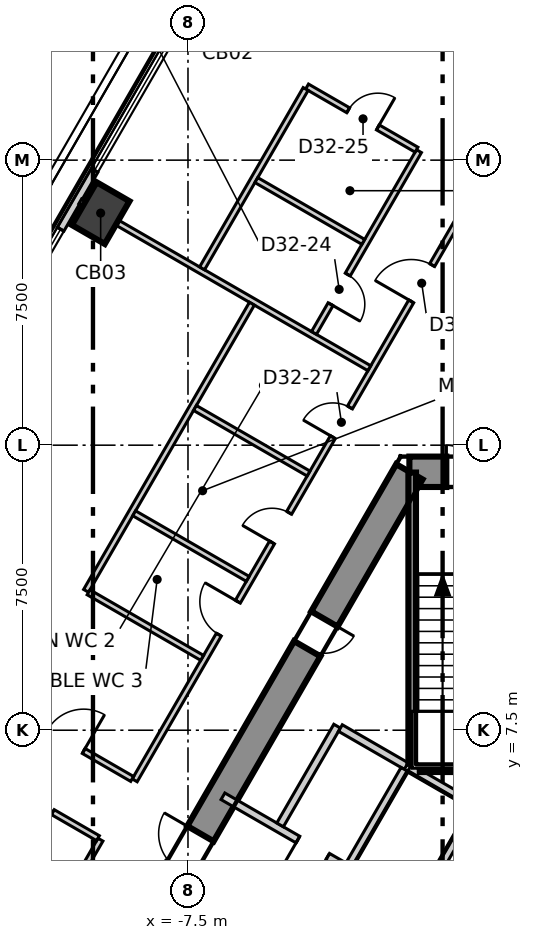
"""IFC4 building model, lengths in metres.
Left out: names, types, materials, properties, quantities, classifications, styles, units other than length and angle.
Written with IfcOpenShell. Run it as: python <this file> out.ifc"""

import sys

from ifc_helpers import new_model, si_unit, direction, frame, frame_2d, origin, origin_2d, place, context, subcontext, project, spatial, polyline, rectangle, outline, extrude, element, fill, save


model = new_model("IFC4")
c1 = context("Model", 3, precision=1e-05, world=origin(), true_north=direction((0.0, 1.0)))
c2 = subcontext(c1, "Body", "Model", "MODEL_VIEW")
j1 = project(units=[si_unit("LENGTHUNIT", "METRE"), si_unit("PLANEANGLEUNIT", "RADIAN")], contexts=[c1])
p1 = place(None, origin())
s1 = spatial("IfcSite", under=j1, at=p1, CompositionType="ELEMENT")
p2 = place(p1, origin())
s2 = spatial("IfcBuilding", under=s1, at=p2, CompositionType="ELEMENT")
p3 = place(p2, frame((0.0, 0.0, 140.3)))
s3 = spatial("IfcBuildingStorey", under=s2, at=p3, CompositionType="ELEMENT", Elevation=140.3)
p4 = place(p3, frame((1.674, 14.3, -0.3), z_axis=(0.0, 0.0, 1.0), x_axis=(-1.0, 0.0, 0.0)))
e1 = element("IfcWall", 1, at=p4, inside=s3, PredefinedType="SHEAR", context=c2, shape_type="SweptSolid", body=[
    extrude(outline(polyline([(-0.231, -0.4), (1.674, -0.4), (3.579, -0.4), (3.117, 0.4), (1.674, 0.4), (0.231, 0.4), (-0.231, -0.4)])), origin(), (0.0, 0.0, 1.0), 4.0),
])
p5 = place(p4, frame((0.974, 0.0, 0.3)))
e2 = element("IfcOpeningElement", 2, at=p5, cuts=e1, PredefinedType="OPENING", context=c2, shape_type="SweptSolid", body=[
    extrude(rectangle(XDim=1.4, YDim=2.1, at=frame_2d((0.7, 1.05))), frame((0.0, 0.41, 0.0), z_axis=(0.0, -1.0, 0.0), x_axis=(1.0, 0.0, 0.0)), (0.0, 0.0, 1.0), 0.82),
])
p6 = place(p3, frame((-1.674, 14.3, -0.3), z_axis=(0.0, 0.0, 1.0), x_axis=(-0.499995765644, -0.866027848477, 0.0)))
e3 = element("IfcWall", 3, at=p6, inside=s3, PredefinedType="SHEAR", context=c2, shape_type="SweptSolid", body=[
    extrude(outline(polyline([(-0.231, -0.4), (1.732, -0.4), (3.695, -0.4), (5.658, -0.4), (7.621, -0.4), (9.584, -0.4), (11.547, -0.4), (13.51, -0.4), (15.473, -0.4), (17.436, -0.4), (19.399, -0.4), (21.362, -0.4), (23.325, -0.4), (22.863, 0.4), (20.977, 0.4), (19.091, 0.4), (17.205, 0.4), (15.319, 0.4), (13.433, 0.4), (11.547, 0.4), (9.661, 0.4), (7.775, 0.4), (5.889, 0.4), (4.003, 0.4), (2.117, 0.4), (0.231, 0.4), (-0.231, -0.4)])), origin(), (0.0, 0.0, 1.0), 4.0),
])
p7 = place(p6, frame((10.997, 0.0, 0.3)))
e4 = element("IfcOpeningElement", 4, at=p7, cuts=e3, PredefinedType="OPENING", context=c2, shape_type="SweptSolid", body=[
    extrude(rectangle(XDim=1.1, YDim=2.1, at=frame_2d((0.55, 1.05))), frame((0.0, 0.41, 0.0), z_axis=(0.0, -1.0, 0.0), x_axis=(1.0, 0.0, 0.0)), (0.0, 0.0, 1.0), 0.82),
])
p8 = place(p6, frame((4.474, 0.0, 0.3)))
e5 = element("IfcOpeningElement", 5, at=p8, cuts=e3, PredefinedType="OPENING", context=c2, shape_type="SweptSolid", body=[
    extrude(rectangle(XDim=0.9, YDim=2.1, at=frame_2d((0.45, 1.05))), frame((0.0, 0.41, 0.0), z_axis=(0.0, -1.0, 0.0), x_axis=(1.0, 0.0, 0.0)), (0.0, 0.0, 1.0), 0.82),
])
p9 = place(p3, frame((-9.798, 21.107, -0.3), z_axis=(0.0, 0.0, 1.0), x_axis=(0.5, 0.866025403784, 0.0)))
e6 = element("IfcColumn", 6, at=p9, inside=s3, PredefinedType="COLUMN", context=c2, shape_type="SweptSolid", body=[
    extrude(rectangle(XDim=1.3, YDim=1.0, at=origin_2d()), origin(), (0.0, 0.0, 1.0), 4.0),
])
p10 = place(p3, frame((-3.063, 34.172, 0.0), z_axis=(0.0, 0.0, 1.0), x_axis=(-0.500008098571, -0.866020728022, 0.0)))
e7 = element("IfcWall", 7, at=p10, inside=s3, PredefinedType="ELEMENTEDWALL", context=c2, shape_type="SweptSolid", body=[
    extrude(rectangle(XDim=56.105, YDim=0.2, at=frame_2d((28.052, 0.0))), origin(), (0.0, 0.0, 1.0), 3.7),
])
p11 = place(p10, frame((2.197, 0.0, 0.9)))
e8 = element("IfcOpeningElement", 8, at=p11, cuts=e7, PredefinedType="OPENING", context=c2, shape_type="SweptSolid", body=[
    extrude(rectangle(XDim=4.9, YDim=2.5, at=frame_2d((2.45, 1.25))), frame((0.0, 0.11, 0.0), z_axis=(0.0, -1.0, 0.0), x_axis=(1.0, 0.0, 0.0)), (0.0, 0.0, 1.0), 0.22),
])
p12 = place(p10, frame((8.887, 0.0, 0.9)))
e9 = element("IfcOpeningElement", 9, at=p12, cuts=e7, PredefinedType="OPENING", context=c2, shape_type="SweptSolid", body=[
    extrude(rectangle(XDim=4.9, YDim=2.5, at=frame_2d((2.45, 1.25))), frame((0.0, 0.11, 0.0), z_axis=(0.0, -1.0, 0.0), x_axis=(1.0, 0.0, 0.0)), (0.0, 0.0, 1.0), 0.22),
])
p13 = place(p10, frame((15.577, 0.0, 0.9)))
e10 = element("IfcOpeningElement", 10, at=p13, cuts=e7, PredefinedType="OPENING", context=c2, shape_type="SweptSolid", body=[
    extrude(rectangle(XDim=4.9, YDim=2.5, at=frame_2d((2.45, 1.25))), frame((0.0, 0.11, 0.0), z_axis=(0.0, -1.0, 0.0), x_axis=(1.0, 0.0, 0.0)), (0.0, 0.0, 1.0), 0.22),
])
p14 = place(p10, frame((22.267, 0.0, 0.9)))
e11 = element("IfcOpeningElement", 11, at=p14, cuts=e7, PredefinedType="OPENING", context=c2, shape_type="SweptSolid", body=[
    extrude(rectangle(XDim=4.9, YDim=2.5, at=frame_2d((2.45, 1.25))), frame((0.0, 0.11, 0.0), z_axis=(0.0, -1.0, 0.0), x_axis=(1.0, 0.0, 0.0)), (0.0, 0.0, 1.0), 0.22),
])
p15 = place(p10, frame((28.957, 0.0, 0.9)))
e12 = element("IfcOpeningElement", 12, at=p15, cuts=e7, PredefinedType="OPENING", context=c2, shape_type="SweptSolid", body=[
    extrude(rectangle(XDim=4.9, YDim=2.5, at=frame_2d((2.45, 1.25))), frame((0.0, 0.11, 0.0), z_axis=(0.0, -1.0, 0.0), x_axis=(1.0, 0.0, 0.0)), (0.0, 0.0, 1.0), 0.22),
])
p16 = place(p10, frame((35.647, 0.0, 0.9)))
e13 = element("IfcOpeningElement", 13, at=p16, cuts=e7, PredefinedType="OPENING", context=c2, shape_type="SweptSolid", body=[
    extrude(rectangle(XDim=4.9, YDim=2.5, at=frame_2d((2.45, 1.25))), frame((0.0, 0.11, 0.0), z_axis=(0.0, -1.0, 0.0), x_axis=(1.0, 0.0, 0.0)), (0.0, 0.0, 1.0), 0.22),
])
p17 = place(p10, frame((42.337, 0.0, 0.9)))
e14 = element("IfcOpeningElement", 14, at=p17, cuts=e7, PredefinedType="OPENING", context=c2, shape_type="SweptSolid", body=[
    extrude(rectangle(XDim=4.9, YDim=2.5, at=frame_2d((2.45, 1.25))), frame((0.0, 0.11, 0.0), z_axis=(0.0, -1.0, 0.0), x_axis=(1.0, 0.0, 0.0)), (0.0, 0.0, 1.0), 0.22),
])
p18 = place(p10, frame((49.027, 0.0, 0.9)))
e15 = element("IfcOpeningElement", 15, at=p18, cuts=e7, PredefinedType="OPENING", context=c2, shape_type="SweptSolid", body=[
    extrude(rectangle(XDim=4.9, YDim=2.5, at=frame_2d((2.45, 1.25))), frame((0.0, 0.11, 0.0), z_axis=(0.0, -1.0, 0.0), x_axis=(1.0, 0.0, 0.0)), (0.0, 0.0, 1.0), 0.22),
])
p19 = place(p3, frame((-18.631, -10.669, 0.0), z_axis=(0.0, 0.0, 1.0), x_axis=(0.50004165882, 0.866001350717, 0.0)))
e16 = element("IfcWall", 16, at=p19, inside=s3, PredefinedType="PARTITIONING", context=c2, shape_type="SweptSolid", body=[
    extrude(rectangle(XDim=17.655, YDim=0.15, at=frame_2d((8.827, 0.0))), origin(), (0.0, 0.0, 1.0), 3.7),
])
p20 = place(p19, frame((10.206, 0.0, 0.0)))
e17 = element("IfcOpeningElement", 17, at=p20, cuts=e16, PredefinedType="OPENING", context=c2, shape_type="SweptSolid", body=[
    extrude(rectangle(XDim=1.1, YDim=2.1, at=frame_2d((0.55, 1.05))), frame((0.0, 0.085, 0.0), z_axis=(0.0, -1.0, 0.0), x_axis=(1.0, 0.0, 0.0)), (0.0, 0.0, 1.0), 0.17),
])
p21 = place(p19, frame((12.406, 0.0, 0.0)))
e18 = element("IfcOpeningElement", 18, at=p21, cuts=e16, PredefinedType="OPENING", context=c2, shape_type="SweptSolid", body=[
    extrude(rectangle(XDim=0.9, YDim=2.1, at=frame_2d((0.45, 1.05))), frame((0.0, 0.085, 0.0), z_axis=(0.0, -1.0, 0.0), x_axis=(1.0, 0.0, 0.0)), (0.0, 0.0, 1.0), 0.17),
])
p22 = place(p19, frame((1.925, 0.0, 0.0)))
e19 = element("IfcOpeningElement", 19, at=p22, cuts=e16, PredefinedType="OPENING", context=c2, shape_type="SweptSolid", body=[
    extrude(rectangle(XDim=1.1, YDim=2.1, at=frame_2d((0.55, 1.05))), frame((0.0, 0.085, 0.0), z_axis=(0.0, -1.0, 0.0), x_axis=(1.0, 0.0, 0.0)), (0.0, 0.0, 1.0), 0.17),
])
p23 = place(p3, frame((-8.902, 6.181, 0.0), z_axis=(0.0, 0.0, 1.0), x_axis=(0.499992688384, 0.866029625107, 0.0)))
e20 = element("IfcWall", 20, at=p23, inside=s3, PredefinedType="PARTITIONING", context=c2, shape_type="SweptSolid", body=[
    extrude(rectangle(XDim=17.804, YDim=0.15, at=frame_2d((8.902, 0.0))), origin(), (0.0, 0.0, 1.0), 3.7),
])
p24 = place(p23, frame((14.554, 0.0, 0.0)))
e21 = element("IfcOpeningElement", 21, at=p24, cuts=e20, PredefinedType="OPENING", context=c2, shape_type="SweptSolid", body=[
    extrude(rectangle(XDim=1.1, YDim=2.1, at=frame_2d((0.55, 1.05))), frame((0.0, 0.085, 0.0), z_axis=(0.0, -1.0, 0.0), x_axis=(1.0, 0.0, 0.0)), (0.0, 0.0, 1.0), 0.17),
])
p25 = place(p23, frame((10.428, 0.0, 0.0)))
e22 = element("IfcOpeningElement", 22, at=p25, cuts=e20, PredefinedType="OPENING", context=c2, shape_type="SweptSolid", body=[
    extrude(rectangle(XDim=0.9, YDim=2.1, at=frame_2d((0.45, 1.05))), frame((0.0, 0.085, 0.0), z_axis=(0.0, -1.0, 0.0), x_axis=(1.0, 0.0, 0.0)), (0.0, 0.0, 1.0), 0.17),
])
p26 = place(p23, frame((7.228, 0.0, 0.0)))
e23 = element("IfcOpeningElement", 23, at=p26, cuts=e20, PredefinedType="OPENING", context=c2, shape_type="SweptSolid", body=[
    extrude(rectangle(XDim=0.9, YDim=2.1, at=frame_2d((0.45, 1.05))), frame((0.0, 0.085, 0.0), z_axis=(0.0, -1.0, 0.0), x_axis=(1.0, 0.0, 0.0)), (0.0, 0.0, 1.0), 0.17),
])
p27 = place(p23, frame((4.428, 0.0, 0.0)))
e24 = element("IfcOpeningElement", 24, at=p27, cuts=e20, PredefinedType="OPENING", context=c2, shape_type="SweptSolid", body=[
    extrude(rectangle(XDim=1.0, YDim=2.1, at=frame_2d((0.5, 1.05))), frame((0.0, 0.085, 0.0), z_axis=(0.0, -1.0, 0.0), x_axis=(1.0, 0.0, 0.0)), (0.0, 0.0, 1.0), 0.17),
])
p28 = place(p3, frame((-13.44, 6.721, 0.0), z_axis=(0.0, 0.0, 1.0), x_axis=(0.865997263264, -0.500048737644, 0.0)))
e25 = element("IfcWall", 25, at=p28, inside=s3, PredefinedType="PARTITIONING", context=c2, shape_type="SweptSolid", body=[
    extrude(rectangle(XDim=4.124, YDim=0.15, at=frame_2d((2.062, 0.0))), origin(), (0.0, 0.0, 1.0), 3.7),
])
p29 = place(p28, frame((1.85, 0.0, 0.0)))
e26 = element("IfcOpeningElement", 26, at=p29, cuts=e25, PredefinedType="OPENING", context=c2, shape_type="SweptSolid", body=[
    extrude(rectangle(XDim=0.9, YDim=2.1, at=frame_2d((0.45, 1.05))), frame((0.0, 0.085, 0.0), z_axis=(0.0, -1.0, 0.0), x_axis=(1.0, 0.0, 0.0)), (0.0, 0.0, 1.0), 0.17),
])
p30 = place(p3, frame((-12.475, 8.242, 0.0), z_axis=(0.0, 0.0, 1.0), x_axis=(0.866060059865, -0.499939969103, 0.0)))
e27 = element("IfcWall", 27, at=p30, inside=s3, PredefinedType="PARTITIONING", context=c2, shape_type="SweptSolid", body=[
    extrude(rectangle(XDim=4.048, YDim=0.15, at=frame_2d((2.024, 0.0))), origin(), (0.0, 0.0, 1.0), 3.7),
])
p31 = place(p30, frame((1.475, 0.0, 0.0)))
e28 = element("IfcOpeningElement", 28, at=p31, cuts=e27, PredefinedType="OPENING", context=c2, shape_type="SweptSolid", body=[
    extrude(rectangle(XDim=1.1, YDim=2.1, at=frame_2d((0.55, 1.05))), frame((0.0, 0.085, 0.0), z_axis=(0.0, -1.0, 0.0), x_axis=(1.0, 0.0, 0.0)), (0.0, 0.0, 1.0), 0.17),
])
p32 = place(p3, frame((-10.335, 21.417, 0.0), z_axis=(0.0, 0.0, 1.0), x_axis=(0.866014327354, -0.50001918445, 0.0)))
e29 = element("IfcWall", 29, at=p32, inside=s3, PredefinedType="PARTITIONING", context=c2, shape_type="SweptSolid", body=[
    extrude(rectangle(XDim=8.784, YDim=0.15, at=frame_2d((4.392, 0.0))), origin(), (0.0, 0.0, 1.0), 3.7),
])
p33 = place(p3, frame((-10.181, 11.167, 0.0), z_axis=(0.0, 0.0, 1.0), x_axis=(0.500033294772, 0.866006180185, 0.0)))
e30 = element("IfcWall", 30, at=p33, inside=s3, PredefinedType="PARTITIONING", context=c2, shape_type="SweptSolid", body=[
    extrude(rectangle(XDim=8.725, YDim=0.15, at=frame_2d((4.363, 0.0))), origin(), (0.0, 0.0, 1.0), 3.7),
])
for number, where, z_axis, x_axis in (
    (31, (-10.116, 11.129, 0.0), (0.0, 0.0, 1.0), (0.866, -0.5, 0.0)),
    (32, (-8.916, 13.208, 0.0), (0.0, 0.0, 1.0), (0.866, -0.5, 0.0)),
    (33, (-7.316, 15.979, 0.0), (0.0, 0.0, 1.0), (0.866, -0.5, 0.0)),
):
    element("IfcWall", number, at=place(p3, frame(where, z_axis=z_axis, x_axis=x_axis)), inside=s3, PredefinedType="PARTITIONING", context=c2, shape_type="SweptSolid", body=[
        extrude(rectangle(XDim=3.45, YDim=0.15, at=frame_2d((1.725, 0.0))), origin(), (0.0, 0.0, 1.0), 3.7),
    ])
p34 = place(p3, frame((-4.184, 17.953, 0.0), z_axis=(0.0, 0.0, 1.0), x_axis=(0.499974945523, 0.866039868511, 0.0)))
e34 = element("IfcWall", 34, at=p34, inside=s3, PredefinedType="PARTITIONING", context=c2, shape_type="SweptSolid", body=[
    extrude(rectangle(XDim=5.524, YDim=0.15, at=frame_2d((2.762, 0.0))), origin(), (0.0, 0.0, 1.0), 3.7),
])
p35 = place(p34, frame((0.874, 0.0, 0.0)))
e35 = element("IfcOpeningElement", 35, at=p35, cuts=e34, PredefinedType="OPENING", context=c2, shape_type="SweptSolid", body=[
    extrude(rectangle(XDim=0.9, YDim=2.1, at=frame_2d((0.45, 1.05))), frame((0.0, 0.085, 0.0), z_axis=(0.0, -1.0, 0.0), x_axis=(1.0, 0.0, 0.0)), (0.0, 0.0, 1.0), 0.17),
])
p36 = place(p3, frame((-4.366, 24.437, 0.0), z_axis=(0.0, 0.0, 1.0), x_axis=(0.866029041019, -0.499993700073, 0.0)))
e36 = element("IfcWall", 36, at=p36, inside=s3, PredefinedType="PARTITIONING", context=c2, shape_type="SweptSolid", body=[
    extrude(rectangle(XDim=3.324, YDim=0.15, at=frame_2d((1.662, 0.0))), origin(), (0.0, 0.0, 1.0), 3.7),
])
p37 = place(p36, frame((1.25, 0.0, 0.0)))
e37 = element("IfcOpeningElement", 37, at=p37, cuts=e36, PredefinedType="OPENING", context=c2, shape_type="SweptSolid", body=[
    extrude(rectangle(XDim=0.9, YDim=2.1, at=frame_2d((0.45, 1.05))), frame((0.0, 0.085, 0.0), z_axis=(0.0, -1.0, 0.0), x_axis=(1.0, 0.0, 0.0)), (0.0, 0.0, 1.0), 0.17),
])
p38 = place(p3, frame((-7.129, 19.653, 0.0), z_axis=(0.0, 0.0, 1.0), x_axis=(0.500046929803, 0.865998307155, 0.0)))
e38 = element("IfcWall", 38, at=p38, inside=s3, PredefinedType="PARTITIONING", context=c2, shape_type="SweptSolid", body=[
    extrude(rectangle(XDim=5.449, YDim=0.15, at=frame_2d((2.725, 0.0))), origin(), (0.0, 0.0, 1.0), 3.7),
])
p39 = place(p3, frame((-5.701, 21.975, 0.0), z_axis=(0.0, 0.0, 1.0), x_axis=(0.865977875238, -0.500082312822, 0.0)))
e39 = element("IfcWall", 39, at=p39, inside=s3, PredefinedType="PARTITIONING", context=c2, shape_type="SweptSolid", body=[
    extrude(rectangle(XDim=3.25, YDim=0.15, at=frame_2d((1.625, 0.0))), origin(), (0.0, 0.0, 1.0), 3.7),
])
p40 = place(p3, frame((-6.58, 5.762, 0.0), z_axis=(0.0, 0.0, 1.0), x_axis=(0.866029704776, -0.49999255039, 0.0)))
e40 = element("IfcWall", 40, at=p40, inside=s3, PredefinedType="SOLIDWALL", context=c2, shape_type="SweptSolid", body=[
    extrude(rectangle(XDim=3.782, YDim=0.2, at=frame_2d((1.891, 0.0))), origin(), (0.0, 0.0, 1.0), 3.7),
])
p41 = place(p40, frame((2.279, 0.0, 0.0)))
e41 = element("IfcOpeningElement", 41, at=p41, cuts=e40, PredefinedType="OPENING", context=c2, shape_type="SweptSolid", body=[
    extrude(rectangle(XDim=0.9, YDim=2.1, at=frame_2d((0.45, 1.05))), frame((0.0, 0.11, 0.0), z_axis=(0.0, -1.0, 0.0), x_axis=(1.0, 0.0, 0.0)), (0.0, 0.0, 1.0), 0.22),
])
p42 = place(p3, frame((-5.076, 5.009, 0.0), z_axis=(0.0, 0.0, 1.0), x_axis=(0.50002537861, 0.866010750942, 0.0)))
e42 = element("IfcWall", 42, at=p42, inside=s3, PredefinedType="SOLIDWALL", context=c2, shape_type="SweptSolid", body=[
    extrude(rectangle(XDim=3.0, YDim=0.2, at=frame_2d((1.5, 0.0))), origin(), (0.0, 0.0, 1.0), 3.7),
])
p43 = place(p3, frame((-3.489, 7.557, 0.0), z_axis=(0.0, 0.0, 1.0), x_axis=(0.866010750942, -0.50002537861, 0.0)))
e43 = element("IfcWall", 43, at=p43, inside=s3, PredefinedType="SOLIDWALL", context=c2, shape_type="SweptSolid", body=[
    extrude(rectangle(XDim=2.0, YDim=0.2, at=frame_2d((1.0, 0.0))), origin(), (0.0, 0.0, 1.0), 3.7),
])
p44 = place(p3, frame((-3.257, 3.959, 0.0), z_axis=(0.0, 0.0, 1.0), x_axis=(0.50012328804, 0.865954211699, 0.0)))
e44 = element("IfcWall", 44, at=p44, inside=s3, PredefinedType="SOLIDWALL", context=c2, shape_type="SweptSolid", body=[
    extrude(rectangle(XDim=2.9, YDim=0.2, at=frame_2d((1.45, 0.0))), origin(), (0.0, 0.0, 1.0), 3.7),
])
p45 = place(p3, frame((-1.67, 6.507, 0.0), z_axis=(0.0, 0.0, 1.0), x_axis=(0.865941441609, -0.500145398563, 0.0)))
e45 = element("IfcWall", 45, at=p45, inside=s3, PredefinedType="SOLIDWALL", context=c2, shape_type="SweptSolid", body=[
    extrude(rectangle(XDim=1.815, YDim=0.2, at=frame_2d((0.908, 0.0))), origin(), (0.0, 0.0, 1.0), 3.7),
])
p46 = place(p3, frame((-1.438, 2.909, 0.0), z_axis=(0.0, 0.0, 1.0), x_axis=(0.499829630636, 0.866123744241, 0.0)))
e46 = element("IfcWall", 46, at=p46, inside=s3, PredefinedType="SOLIDWALL", context=c2, shape_type="SweptSolid", body=[
    extrude(rectangle(XDim=2.761, YDim=0.2, at=frame_2d((1.38, 0.0))), origin(), (0.0, 0.0, 1.0), 3.7),
])
p47 = place(p3, frame((-1.4, 6.5, 0.0), z_axis=(0.0, 0.0, 1.0), x_axis=(1.0, 0.0, 0.0)))
e47 = element("IfcWall", 47, at=p47, inside=s3, PredefinedType="SOLIDWALL", context=c2, shape_type="SweptSolid", body=[
    extrude(rectangle(XDim=2.8, YDim=0.2, at=frame_2d((1.4, 0.0))), origin(), (0.0, 0.0, 1.0), 3.7),
])
p48 = place(p3, frame((-1.6, 6.615, 0.0), z_axis=(0.0, 0.0, 1.0), x_axis=(0.0, 1.0, 0.0)))
e48 = element("IfcWall", 48, at=p48, inside=s3, PredefinedType="SOLIDWALL", context=c2, shape_type="SweptSolid", body=[
    extrude(rectangle(XDim=7.665, YDim=0.2, at=frame_2d((3.833, 0.0))), origin(), (0.0, 0.0, 1.0), 3.7),
])
p49 = place(p12, origin())
e49 = element("IfcWindow", 49, at=p49, inside=s3, PartitioningType="SINGLE_PANEL", PredefinedType="WINDOW", context=c2, shape_type="SweptSolid", body=[
    extrude(rectangle(XDim=4.9, YDim=2.5, at=frame_2d((2.45, 1.25))), frame((0.0, 0.03, 0.0), z_axis=(0.0, -1.0, 0.0), x_axis=(1.0, 0.0, 0.0)), (0.0, 0.0, 1.0), 0.06),
])
fill(e9, e49)
p50 = place(p13, origin())
e50 = element("IfcWindow", 50, at=p50, inside=s3, PartitioningType="SINGLE_PANEL", PredefinedType="WINDOW", context=c2, shape_type="SweptSolid", body=[
    extrude(rectangle(XDim=4.9, YDim=2.5, at=frame_2d((2.45, 1.25))), frame((0.0, 0.03, 0.0), z_axis=(0.0, -1.0, 0.0), x_axis=(1.0, 0.0, 0.0)), (0.0, 0.0, 1.0), 0.06),
])
fill(e10, e50)
p51 = place(p41, origin())
e51 = element("IfcDoor", 51, at=p51, inside=s3, OperationType="SINGLE_SWING_LEFT", PredefinedType="DOOR", context=c2, shape_type="SweptSolid", body=[
    extrude(rectangle(XDim=0.9, YDim=2.1, at=frame_2d((0.45, 1.05))), frame((0.0, 0.025, 0.0), z_axis=(0.0, -1.0, 0.0), x_axis=(1.0, 0.0, 0.0)), (0.0, 0.0, 1.0), 0.05),
])
fill(e41, e51)
p52 = place(p24, origin())
e52 = element("IfcDoor", 52, at=p52, inside=s3, OperationType="SINGLE_SWING_RIGHT", PredefinedType="DOOR", context=c2, shape_type="SweptSolid", body=[
    extrude(rectangle(XDim=1.1, YDim=2.1, at=frame_2d((0.55, 1.05))), frame((0.0, 0.025, 0.0), z_axis=(0.0, -1.0, 0.0), x_axis=(1.0, 0.0, 0.0)), (0.0, 0.0, 1.0), 0.05),
])
fill(e21, e52)
p53 = place(p35, origin())
e53 = element("IfcDoor", 53, at=p53, inside=s3, OperationType="SINGLE_SWING_LEFT", PredefinedType="DOOR", context=c2, shape_type="SweptSolid", body=[
    extrude(rectangle(XDim=0.9, YDim=2.1, at=frame_2d((0.45, 1.05))), frame((0.0, 0.025, 0.0), z_axis=(0.0, -1.0, 0.0), x_axis=(1.0, 0.0, 0.0)), (0.0, 0.0, 1.0), 0.05),
])
fill(e35, e53)
p54 = place(p37, origin())
e54 = element("IfcDoor", 54, at=p54, inside=s3, OperationType="SINGLE_SWING_LEFT", PredefinedType="DOOR", context=c2, shape_type="SweptSolid", body=[
    extrude(rectangle(XDim=0.9, YDim=2.1, at=frame_2d((0.45, 1.05))), frame((0.0, 0.025, 0.0), z_axis=(0.0, -1.0, 0.0), x_axis=(1.0, 0.0, 0.0)), (0.0, 0.0, 1.0), 0.05),
])
fill(e37, e54)
p55 = place(p31, origin())
e55 = element("IfcDoor", 55, at=p55, inside=s3, OperationType="SINGLE_SWING_LEFT", PredefinedType="DOOR", context=c2, shape_type="SweptSolid", body=[
    extrude(rectangle(XDim=1.1, YDim=2.1, at=frame_2d((0.55, 1.05))), frame((0.0, 0.025, 0.0), z_axis=(0.0, -1.0, 0.0), x_axis=(1.0, 0.0, 0.0)), (0.0, 0.0, 1.0), 0.05),
])
fill(e28, e55)
p56 = place(p25, origin())
e56 = element("IfcDoor", 56, at=p56, inside=s3, OperationType="SINGLE_SWING_RIGHT", PredefinedType="DOOR", context=c2, shape_type="SweptSolid", body=[
    extrude(rectangle(XDim=0.9, YDim=2.1, at=frame_2d((0.45, 1.05))), frame((0.0, 0.025, 0.0), z_axis=(0.0, -1.0, 0.0), x_axis=(1.0, 0.0, 0.0)), (0.0, 0.0, 1.0), 0.05),
])
fill(e22, e56)
p57 = place(p26, origin())
e57 = element("IfcDoor", 57, at=p57, inside=s3, OperationType="SINGLE_SWING_RIGHT", PredefinedType="DOOR", context=c2, shape_type="SweptSolid", body=[
    extrude(rectangle(XDim=0.9, YDim=2.1, at=frame_2d((0.45, 1.05))), frame((0.0, 0.025, 0.0), z_axis=(0.0, -1.0, 0.0), x_axis=(1.0, 0.0, 0.0)), (0.0, 0.0, 1.0), 0.05),
])
fill(e23, e57)
p58 = place(p27, origin())
e58 = element("IfcDoor", 58, at=p58, inside=s3, OperationType="SINGLE_SWING_LEFT", PredefinedType="DOOR", context=c2, shape_type="SweptSolid", body=[
    extrude(rectangle(XDim=1.0, YDim=2.1, at=frame_2d((0.5, 1.05))), frame((0.0, 0.025, 0.0), z_axis=(0.0, -1.0, 0.0), x_axis=(1.0, 0.0, 0.0)), (0.0, 0.0, 1.0), 0.05),
])
fill(e24, e58)
p59 = place(p29, origin())
e59 = element("IfcDoor", 59, at=p59, inside=s3, OperationType="SINGLE_SWING_LEFT", PredefinedType="DOOR", context=c2, shape_type="SweptSolid", body=[
    extrude(rectangle(XDim=0.9, YDim=2.1, at=frame_2d((0.45, 1.05))), frame((0.0, 0.025, 0.0), z_axis=(0.0, -1.0, 0.0), x_axis=(1.0, 0.0, 0.0)), (0.0, 0.0, 1.0), 0.05),
])
fill(e26, e59)
p60 = place(p5, origin())
e60 = element("IfcDoor", 60, at=p60, inside=s3, OperationType="DOUBLE_DOOR_SINGLE_SWING", PredefinedType="DOOR", context=c2, shape_type="SweptSolid", body=[
    extrude(rectangle(XDim=1.4, YDim=2.1, at=frame_2d((0.7, 1.05))), frame((0.0, 0.025, 0.0), z_axis=(0.0, -1.0, 0.0), x_axis=(1.0, 0.0, 0.0)), (0.0, 0.0, 1.0), 0.05),
])
fill(e2, e60)
p61 = place(p7, origin())
e61 = element("IfcDoor", 61, at=p61, inside=s3, OperationType="SINGLE_SWING_LEFT", PredefinedType="DOOR", context=c2, shape_type="SweptSolid", body=[
    extrude(rectangle(XDim=1.1, YDim=2.1, at=frame_2d((0.55, 1.05))), frame((0.0, 0.025, 0.0), z_axis=(0.0, -1.0, 0.0), x_axis=(1.0, 0.0, 0.0)), (0.0, 0.0, 1.0), 0.05),
])
fill(e4, e61)
p62 = place(p8, origin())
e62 = element("IfcDoor", 62, at=p62, inside=s3, OperationType="SINGLE_SWING_RIGHT", PredefinedType="DOOR", context=c2, shape_type="SweptSolid", body=[
    extrude(rectangle(XDim=0.9, YDim=2.1, at=frame_2d((0.45, 1.05))), frame((0.0, 0.025, 0.0), z_axis=(0.0, -1.0, 0.0), x_axis=(1.0, 0.0, 0.0)), (0.0, 0.0, 1.0), 0.05),
])
fill(e5, e62)
save(model, sys.argv[1])
